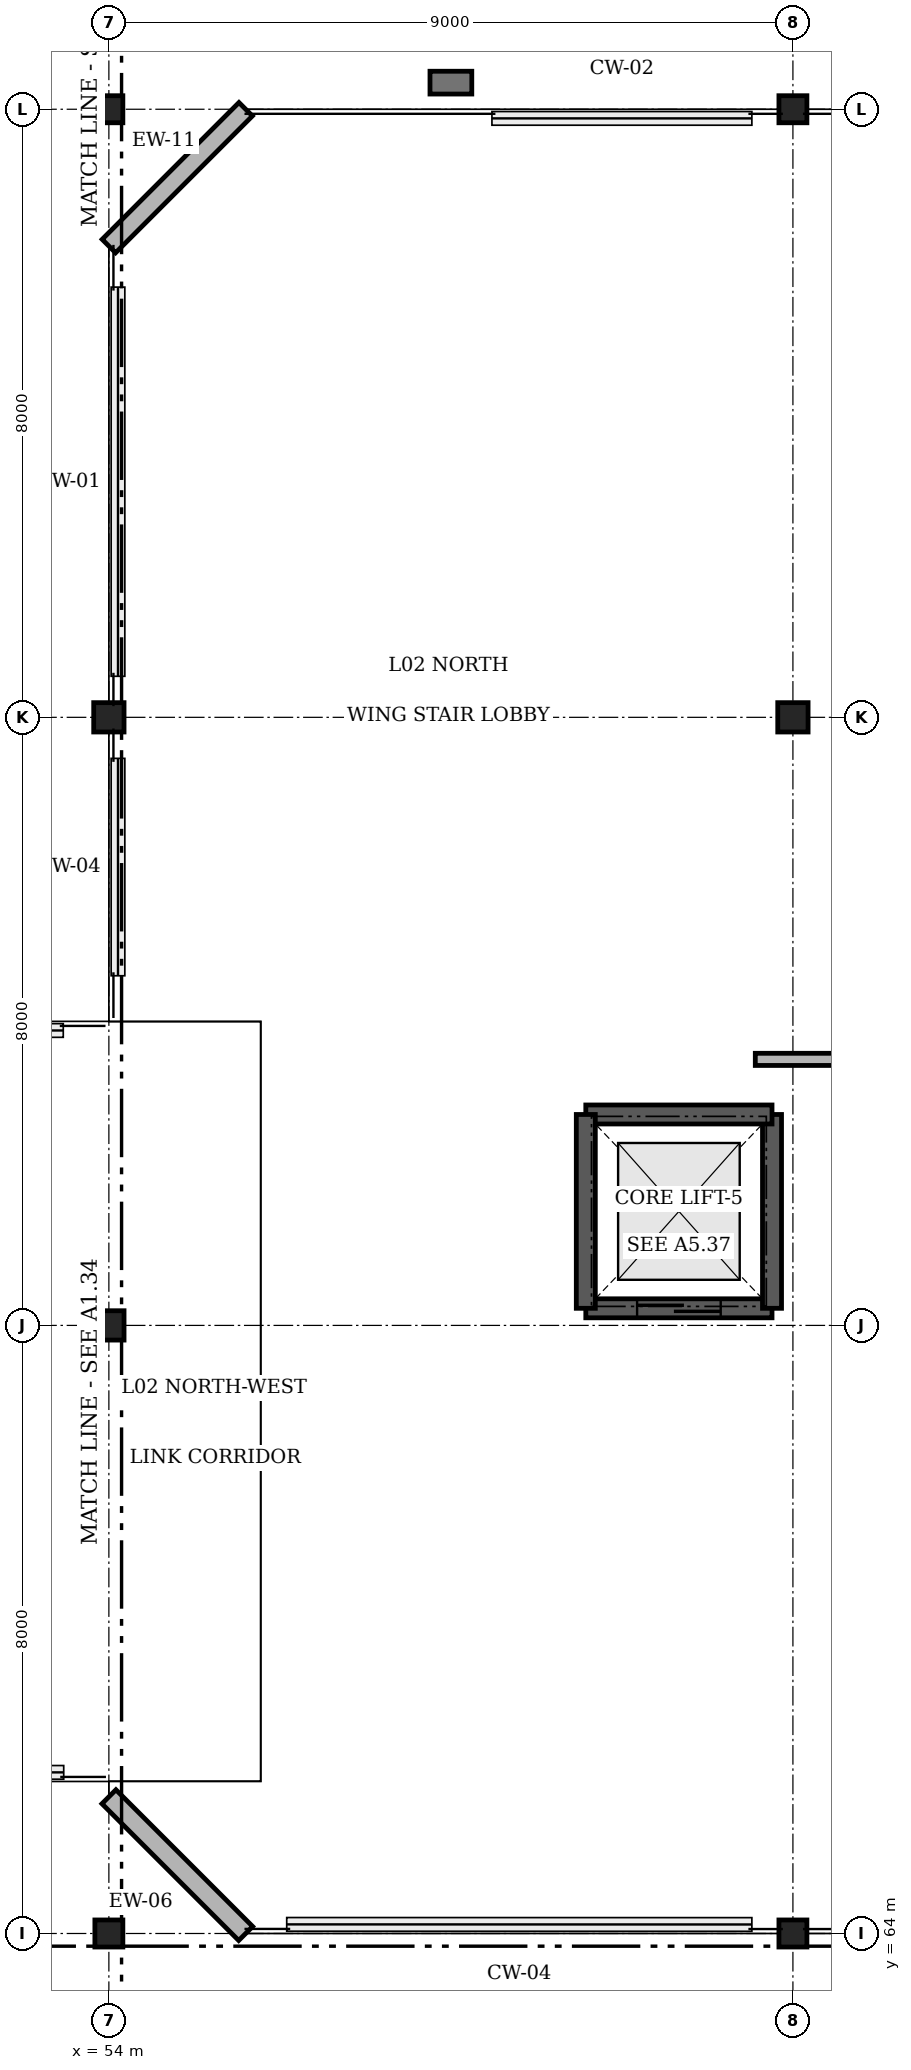
"""IFC4 building model, lengths in metres.
Left out: names, types, materials, properties, quantities, classifications, styles, units other than length and angle.
Written with IfcOpenShell. Run it as: python <this file> out.ifc"""

import sys

from ifc_helpers import new_model, si_unit, direction, frame, frame_2d, origin, origin_2d, place, context, subcontext, project, spatial, rectangle, i_section, extrude, element, fill, save


model = new_model("IFC4")
c1 = context("Model", 3, precision=1e-05, world=origin(), true_north=direction((0.0, 1.0)))
c2 = subcontext(c1, "Body", "Model", "MODEL_VIEW")
j1 = project(units=[si_unit("LENGTHUNIT", "METRE"), si_unit("PLANEANGLEUNIT", "RADIAN")], contexts=[c1])
p1 = place(None, origin())
s1 = spatial("IfcSite", under=j1, at=p1, CompositionType="ELEMENT")
p2 = place(p1, origin())
s2 = spatial("IfcBuilding", under=s1, at=p2, CompositionType="ELEMENT")
p3 = place(p2, frame((0.0, 0.0, 10.8)))
s3 = spatial("IfcBuildingStorey", under=s2, at=p3, CompositionType="ELEMENT", Elevation=10.8)
p4 = place(p3, frame((54.0, 64.0, 0.0), z_axis=(0.0, 0.0, 1.0), x_axis=(1.0, 0.0, 0.0)))
e1 = element("IfcColumn", 1, at=p4, inside=s3, PredefinedType="COLUMN", context=c2, shape_type="SweptSolid", body=[
    extrude(i_section(OverallWidth=0.368, OverallDepth=0.356, WebThickness=0.011, FlangeThickness=0.018, FilletRadius=0.015, at=origin_2d()), origin(), (0.0, 0.0, 1.0), 4.8),
])
for number, where, z_axis, x_axis in (
    (2, (54.0, 72.0, 0.0), (0.0, 0.0, 1.0), (1.0, 0.0, 0.0)),
    (3, (54.0, 80.0, 0.0), (0.0, 0.0, 1.0), (1.0, 0.0, 0.0)),
):
    element("IfcColumn", number, at=place(p3, frame(where, z_axis=z_axis, x_axis=x_axis)), inside=s3, PredefinedType="COLUMN", context=c2, shape_type="SweptSolid", body=[
        extrude(i_section(OverallWidth=0.399, OverallDepth=0.386, WebThickness=0.021, FlangeThickness=0.033, FilletRadius=0.015, at=origin_2d()), origin(), (0.0, 0.0, 1.0), 4.8),
    ])
for number, where, z_axis, x_axis in (
    (4, (54.0, 88.0, 0.0), (0.0, 0.0, 1.0), (1.0, 0.0, 0.0)),
    (5, (63.0, 64.0, 0.0), (0.0, 0.0, 1.0), (1.0, 0.0, 0.0)),
):
    element("IfcColumn", number, at=place(p3, frame(where, z_axis=z_axis, x_axis=x_axis)), inside=s3, PredefinedType="COLUMN", context=c2, shape_type="SweptSolid", body=[
        extrude(i_section(OverallWidth=0.368, OverallDepth=0.356, WebThickness=0.011, FlangeThickness=0.018, FilletRadius=0.015, at=origin_2d()), origin(), (0.0, 0.0, 1.0), 4.8),
    ])
p5 = place(p3, frame((63.0, 80.0, 0.0), z_axis=(0.0, 0.0, 1.0), x_axis=(1.0, 0.0, 0.0)))
e6 = element("IfcColumn", 6, at=p5, inside=s3, PredefinedType="COLUMN", context=c2, shape_type="SweptSolid", body=[
    extrude(i_section(OverallWidth=0.399, OverallDepth=0.386, WebThickness=0.021, FlangeThickness=0.033, FilletRadius=0.015, at=origin_2d()), origin(), (0.0, 0.0, 1.0), 4.8),
])
p6 = place(p3, frame((63.0, 88.0, 0.0), z_axis=(0.0, 0.0, 1.0), x_axis=(1.0, 0.0, 0.0)))
e7 = element("IfcColumn", 7, at=p6, inside=s3, PredefinedType="COLUMN", context=c2, shape_type="SweptSolid", body=[
    extrude(i_section(OverallWidth=0.368, OverallDepth=0.356, WebThickness=0.011, FlangeThickness=0.018, FilletRadius=0.015, at=origin_2d()), origin(), (0.0, 0.0, 1.0), 4.8),
])
p7 = place(p3, frame((58.5, 88.35, 0.0), z_axis=(0.0, 0.0, 1.0), x_axis=(1.0, 0.0, 0.0)))
e8 = element("IfcColumn", 8, at=p7, inside=s3, PredefinedType="PILASTER", context=c2, shape_type="SweptSolid", body=[
    extrude(rectangle(XDim=0.55, YDim=0.3, at=origin_2d()), origin(), (0.0, 0.0, 1.0), 4.8),
])
p8 = place(p3, frame((54.0, 86.2, 0.0), z_axis=(0.0, 0.0, 1.0), x_axis=(0.707106781187, 0.707106781187, 0.0)))
e9 = element("IfcWall", 9, at=p8, inside=s3, PredefinedType="SOLIDWALL", context=c2, shape_type="SweptSolid", body=[
    extrude(rectangle(XDim=2.546, YDim=0.25, at=frame_2d((1.273, 0.0))), origin(), (0.0, 0.0, 1.0), 3.654),
])
p9 = place(p3, frame((55.8, 64.0, 0.0), z_axis=(0.0, 0.0, 1.0), x_axis=(-0.707106781187, 0.707106781187, 0.0)))
e10 = element("IfcWall", 10, at=p9, inside=s3, PredefinedType="SOLIDWALL", context=c2, shape_type="SweptSolid", body=[
    extrude(rectangle(XDim=2.544, YDim=0.26, at=frame_2d((1.272, 0.0))), origin(), (0.0, 0.0, 1.0), 3.578),
])
p10 = place(p3, frame((60.275, 72.225, 0.0), z_axis=(0.0, 0.0, 1.0), x_axis=(1.0, 0.0, 0.0)))
e11 = element("IfcWall", 11, at=p10, inside=s3, PredefinedType="SOLIDWALL", context=c2, shape_type="SweptSolid", body=[
    extrude(rectangle(XDim=2.45, YDim=0.25, at=frame_2d((1.225, 0.0))), origin(), (0.0, 0.0, 1.0), 4.8),
])
p11 = place(p10, frame((0.675, 0.0, 0.0)))
e12 = element("IfcOpeningElement", 12, at=p11, cuts=e11, PredefinedType="OPENING", context=c2, shape_type="SweptSolid", body=[
    extrude(rectangle(XDim=1.1, YDim=2.2, at=frame_2d((0.55, 1.1))), frame((0.0, 0.135, 0.0), z_axis=(0.0, -1.0, 0.0), x_axis=(1.0, 0.0, 0.0)), (0.0, 0.0, 1.0), 0.27),
])
p12 = place(p3, frame((62.725, 72.225, 0.0), z_axis=(0.0, 0.0, 1.0), x_axis=(0.0, 1.0, 0.0)))
e13 = element("IfcWall", 13, at=p12, inside=s3, PredefinedType="SOLIDWALL", context=c2, shape_type="SweptSolid", body=[
    extrude(rectangle(XDim=2.55, YDim=0.25, at=frame_2d((1.275, 0.0))), origin(), (0.0, 0.0, 1.0), 4.8),
])
p13 = place(p3, frame((62.725, 74.775, 0.0), z_axis=(0.0, 0.0, 1.0), x_axis=(-1.0, 0.0, 0.0)))
e14 = element("IfcWall", 14, at=p13, inside=s3, PredefinedType="SOLIDWALL", context=c2, shape_type="SweptSolid", body=[
    extrude(rectangle(XDim=2.45, YDim=0.25, at=frame_2d((1.225, 0.0))), origin(), (0.0, 0.0, 1.0), 4.8),
])
p14 = place(p3, frame((60.275, 74.775, 0.0), z_axis=(0.0, 0.0, 1.0), x_axis=(0.0, -1.0, 0.0)))
e15 = element("IfcWall", 15, at=p14, inside=s3, PredefinedType="SOLIDWALL", context=c2, shape_type="SweptSolid", body=[
    extrude(rectangle(XDim=2.55, YDim=0.25, at=frame_2d((1.275, 0.0))), origin(), (0.0, 0.0, 1.0), 4.8),
])
p15 = place(p3, frame((62.505, 75.5, 0.0), z_axis=(0.0, 0.0, 1.0), x_axis=(1.0, 0.0, 0.0)))
e16 = element("IfcWall", 16, at=p15, inside=s3, PredefinedType="PARTITIONING", context=c2, shape_type="SweptSolid", body=[
    extrude(rectangle(XDim=3.968, YDim=0.16, at=frame_2d((1.984, 0.0))), origin(), (0.0, 0.0, 1.0), 3.15),
])
p16 = place(p11, origin())
e17 = element("IfcDoor", 17, at=p16, inside=s3, OperationType="SLIDING_TO_LEFT", PredefinedType="DOOR", context=c2, shape_type="SweptSolid", body=[
    extrude(rectangle(XDim=1.1, YDim=2.2, at=frame_2d((0.55, 1.1))), frame((0.0, 0.025, 0.0), z_axis=(0.0, -1.0, 0.0), x_axis=(1.0, 0.0, 0.0)), (0.0, 0.0, 1.0), 0.05),
])
fill(e12, e17)
save(model, sys.argv[1])
